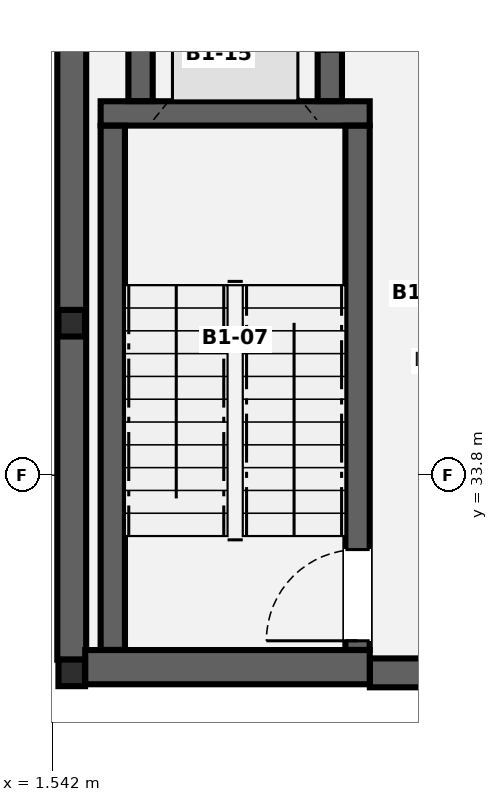
"""IFC4 building model, lengths in metres.
Left out: names, types, materials, properties, quantities, classifications, styles, units other than length and angle.
Written with IfcOpenShell. Run it as: python <this file> out.ifc"""

import sys

from ifc_helpers import new_model, si_unit, direction, frame, frame_2d, origin, origin_2d, place, context, subcontext, project, spatial, rectangle, i_section, extrude, element, fill, save


model = new_model("IFC4")
c1 = context("Model", 3, precision=1e-05, world=origin(), true_north=direction((0.0, 1.0)))
c2 = subcontext(c1, "Body", "Model", "MODEL_VIEW")
j1 = project(units=[si_unit("LENGTHUNIT", "METRE"), si_unit("PLANEANGLEUNIT", "RADIAN")], contexts=[c1])
p1 = place(None, origin())
s1 = spatial("IfcSite", under=j1, at=p1, CompositionType="ELEMENT")
p2 = place(p1, origin())
s2 = spatial("IfcBuilding", under=s1, at=p2, CompositionType="ELEMENT")
p3 = place(p2, frame((0.0, 0.0, -4.2)))
s3 = spatial("IfcBuildingStorey", under=s2, at=p3, CompositionType="ELEMENT", Elevation=-4.2)
for number, where, z_axis, x_axis in (
    (1, (1.8, 31.2, 0.0), (0.0, 0.0, 1.0), (1.0, 0.0, 0.0)),
    (2, (1.8, 35.8, 0.0), (0.0, 0.0, 1.0), (1.0, 0.0, 0.0)),
):
    element("IfcColumn", number, at=place(p3, frame(where, z_axis=z_axis, x_axis=x_axis)), inside=s3, PredefinedType="COLUMN", context=c2, shape_type="SweptSolid", body=[
        extrude(i_section(OverallWidth=0.35, OverallDepth=0.35, WebThickness=0.02, FlangeThickness=0.032, FilletRadius=0.016, at=origin_2d()), origin(), (0.0, 0.0, 1.0), 4.2),
    ])
p4 = place(p3, frame((1.8, 31.373, 0.0), z_axis=(0.0, 0.0, 1.0), x_axis=(0.0, 1.0, 0.0)))
e3 = element("IfcWall", 3, at=p4, inside=s3, PredefinedType="USERDEFINED", context=c2, shape_type="SweptSolid", body=[
    extrude(rectangle(XDim=41.854, YDim=0.38, at=frame_2d((20.927, 0.0))), origin(), (0.0, 0.0, 1.0), 3.9),
])
p5 = place(p3, frame((27.027, 31.2, 0.0), z_axis=(0.0, 0.0, 1.0), x_axis=(-1.0, 0.0, 0.0)))
e4 = element("IfcWall", 4, at=p5, inside=s3, PredefinedType="USERDEFINED", context=c2, shape_type="SweptSolid", body=[
    extrude(rectangle(XDim=21.305, YDim=0.38, at=frame_2d((10.653, 0.0))), origin(), (0.0, 0.0, 1.0), 3.9),
])
p6 = place(p3, frame((1.977, 31.275, 0.0), z_axis=(0.0, 0.0, 1.0), x_axis=(1.0, 0.0, 0.0)))
e5 = element("IfcWall", 5, at=p6, inside=s3, PredefinedType="SHEAR", context=c2, shape_type="SweptSolid", body=[
    extrude(rectangle(XDim=3.743, YDim=0.45, at=frame_2d((1.872, 0.0))), origin(), (0.0, 0.0, 1.0), 3.94),
])
p7 = place(p3, frame((2.18, 38.56, 0.0), z_axis=(0.0, 0.0, 1.0), x_axis=(1.0, 0.0, 0.0)))
e6 = element("IfcWall", 6, at=p7, inside=s3, PredefinedType="SHEAR", context=c2, shape_type="SweptSolid", body=[
    extrude(rectangle(XDim=3.54, YDim=0.32, at=frame_2d((1.77, 0.0))), origin(), (0.0, 0.0, 1.0), 3.94),
])
p8 = place(p3, frame((2.34, 31.502, 0.0), z_axis=(0.0, 0.0, 1.0), x_axis=(0.0, 1.0, 0.0)))
e7 = element("IfcWall", 7, at=p8, inside=s3, PredefinedType="SHEAR", context=c2, shape_type="SweptSolid", body=[
    extrude(rectangle(XDim=6.896, YDim=0.32, at=frame_2d((3.448, 0.0))), origin(), (0.0, 0.0, 1.0), 3.94),
])
p9 = place(p3, frame((5.56, 31.502, 0.0), z_axis=(0.0, 0.0, 1.0), x_axis=(0.0, 1.0, 0.0)))
e8 = element("IfcWall", 8, at=p9, inside=s3, PredefinedType="SHEAR", context=c2, shape_type="SweptSolid", body=[
    extrude(rectangle(XDim=6.896, YDim=0.32, at=frame_2d((3.448, 0.0))), origin(), (0.0, 0.0, 1.0), 3.94),
])
p10 = place(p9, frame((0.12, 0.0, 0.0)))
e9 = element("IfcOpeningElement", 9, at=p10, cuts=e8, PredefinedType="OPENING", context=c2, shape_type="SweptSolid", body=[
    extrude(rectangle(XDim=1.2, YDim=2.15, at=frame_2d((0.6, 1.075))), frame((0.0, 0.17, 0.0), z_axis=(0.0, -1.0, 0.0), x_axis=(1.0, 0.0, 0.0)), (0.0, 0.0, 1.0), 0.34),
])
p11 = place(p3, frame((2.705, 38.722, 0.0), z_axis=(0.0, 0.0, 1.0), x_axis=(0.0, 1.0, 0.0)))
e10 = element("IfcWall", 10, at=p11, inside=s3, PredefinedType="SHEAR", context=c2, shape_type="SweptSolid", body=[
    extrude(rectangle(XDim=2.411, YDim=0.32, at=frame_2d((1.206, 0.0))), origin(), (0.0, 0.0, 1.0), 3.94),
])
p12 = place(p3, frame((5.195, 38.722, 0.0), z_axis=(0.0, 0.0, 1.0), x_axis=(0.0, 1.0, 0.0)))
e11 = element("IfcWall", 11, at=p12, inside=s3, PredefinedType="SHEAR", context=c2, shape_type="SweptSolid", body=[
    extrude(rectangle(XDim=2.411, YDim=0.32, at=frame_2d((1.206, 0.0))), origin(), (0.0, 0.0, 1.0), 3.94),
])
p13 = place(p12, frame((0.656, 0.0, 0.0)))
e12 = element("IfcOpeningElement", 12, at=p13, cuts=e11, PredefinedType="OPENING", context=c2, shape_type="SweptSolid", body=[
    extrude(rectangle(XDim=1.1, YDim=2.15, at=frame_2d((0.55, 1.075))), frame((0.0, 0.17, 0.0), z_axis=(0.0, -1.0, 0.0), x_axis=(1.0, 0.0, 0.0)), (0.0, 0.0, 1.0), 0.34),
])
p14 = place(p10, origin())
e13 = element("IfcDoor", 13, at=p14, inside=s3, OperationType="SINGLE_SWING_LEFT", PredefinedType="DOOR", context=c2, shape_type="SweptSolid", body=[
    extrude(rectangle(XDim=1.2, YDim=2.15, at=frame_2d((0.6, 1.075))), frame((0.0, 0.025, 0.0), z_axis=(0.0, -1.0, 0.0), x_axis=(1.0, 0.0, 0.0)), (0.0, 0.0, 1.0), 0.05),
])
fill(e9, e13)
save(model, sys.argv[1])
